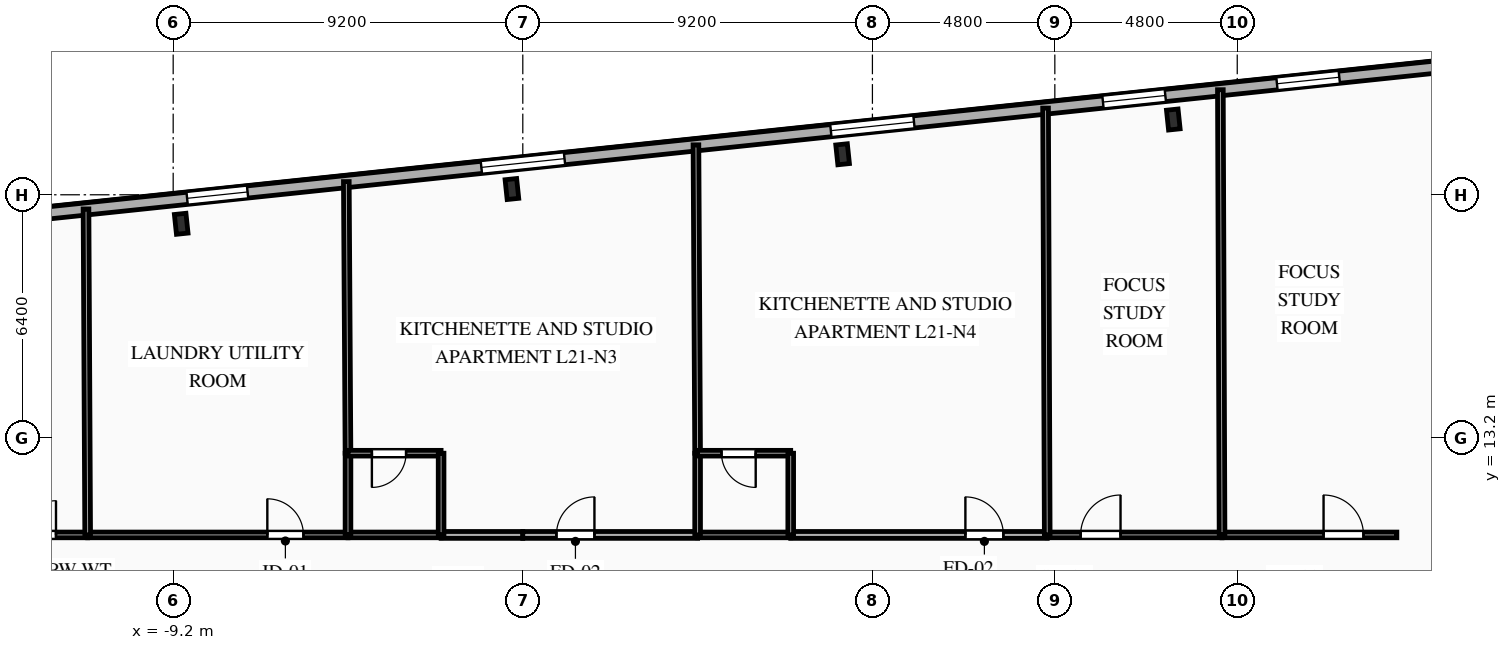
"""IFC4 building model, lengths in metres.
Left out: names, types, materials, properties, quantities, classifications, styles, units other than length and angle.
Written with IfcOpenShell. Run it as: python <this file> out.ifc"""

import sys

from ifc_helpers import new_model, si_unit, direction, frame, frame_2d, origin, origin_2d, place, context, subcontext, project, spatial, rectangle, i_section, extrude, element, fill, save


model = new_model("IFC4")
c1 = context("Model", 3, precision=1e-05, world=origin(), true_north=direction((0.0, 1.0)))
c2 = subcontext(c1, "Body", "Model", "MODEL_VIEW")
j1 = project(units=[si_unit("LENGTHUNIT", "METRE"), si_unit("PLANEANGLEUNIT", "RADIAN")], contexts=[c1])
p1 = place(None, origin())
s1 = spatial("IfcSite", under=j1, at=p1, CompositionType="ELEMENT")
p2 = place(p1, origin())
s2 = spatial("IfcBuilding", under=s1, at=p2, CompositionType="ELEMENT")
p3 = place(p2, frame((0.0, 0.0, 79.0)))
s3 = spatial("IfcBuildingStorey", under=s2, at=p3, CompositionType="ELEMENT", Elevation=79.0)
for number, where, z_axis, x_axis in (
    (1, (17.117, 21.58, 0.0), (0.0, 0.0, 1.0), (0.995, 0.105, 0.0)),
    (2, (8.415, 20.666, 0.0), (0.0, 0.0, 1.0), (0.995, 0.105, 0.0)),
    (3, (-0.287, 19.751, 0.0), (0.0, 0.0, 1.0), (0.995, 0.105, 0.0)),
    (4, (-8.989, 18.836, 0.0), (0.0, 0.0, 1.0), (0.995, 0.105, 0.0)),
):
    element("IfcColumn", number, at=place(p3, frame(where, z_axis=z_axis, x_axis=x_axis)), inside=s3, PredefinedType="COLUMN", context=c2, shape_type="SweptSolid", body=[
        extrude(i_section(OverallWidth=0.306, OverallDepth=0.524, WebThickness=0.021, FlangeThickness=0.04, FilletRadius=0.027, at=origin_2d()), origin(), (0.0, 0.0, 1.0), 3.35),
    ])
p4 = place(p3, frame((-27.107, 17.586, 0.0), z_axis=(0.0, 0.0, 1.0), x_axis=(0.994521628355, 0.104531003701, 0.0)))
e5 = element("IfcWall", 5, at=p4, inside=s3, PredefinedType="SOLIDWALL", context=c2, shape_type="SweptSolid", body=[
    extrude(rectangle(XDim=53.8, YDim=0.32, at=frame_2d((26.9, 0.0))), origin(), (0.0, 0.0, 1.0), 3.045),
])
p5 = place(p4, frame((1.482, 0.0, 0.85)))
e6 = element("IfcOpeningElement", 6, at=p5, cuts=e5, PredefinedType="OPENING", context=c2, shape_type="SweptSolid", body=[
    extrude(rectangle(XDim=1.6, YDim=1.85, at=frame_2d((0.8, 0.925))), frame((0.0, 0.17, 0.0), z_axis=(0.0, -1.0, 0.0), x_axis=(1.0, 0.0, 0.0)), (0.0, 0.0, 1.0), 0.34),
])
p6 = place(p4, frame((7.902, 0.0, 0.85)))
e7 = element("IfcOpeningElement", 7, at=p6, cuts=e5, PredefinedType="OPENING", context=c2, shape_type="SweptSolid", body=[
    extrude(rectangle(XDim=1.65, YDim=1.85, at=frame_2d((0.825, 0.925))), frame((0.0, 0.17, 0.0), z_axis=(0.0, -1.0, 0.0), x_axis=(1.0, 0.0, 0.0)), (0.0, 0.0, 1.0), 0.34),
])
p7 = place(p4, frame((18.374, 0.0, 0.85)))
e8 = element("IfcOpeningElement", 8, at=p7, cuts=e5, PredefinedType="OPENING", context=c2, shape_type="SweptSolid", body=[
    extrude(rectangle(XDim=1.6, YDim=1.85, at=frame_2d((0.8, 0.925))), frame((0.0, 0.17, 0.0), z_axis=(0.0, -1.0, 0.0), x_axis=(1.0, 0.0, 0.0)), (0.0, 0.0, 1.0), 0.34),
])
p8 = place(p4, frame((26.16, 0.0, 0.85)))
e9 = element("IfcOpeningElement", 9, at=p8, cuts=e5, PredefinedType="OPENING", context=c2, shape_type="SweptSolid", body=[
    extrude(rectangle(XDim=2.2, YDim=1.85, at=frame_2d((1.1, 0.925))), frame((0.0, 0.17, 0.0), z_axis=(0.0, -1.0, 0.0), x_axis=(1.0, 0.0, 0.0)), (0.0, 0.0, 1.0), 0.34),
])
p9 = place(p4, frame((35.407, 0.0, 0.85)))
e10 = element("IfcOpeningElement", 10, at=p9, cuts=e5, PredefinedType="OPENING", context=c2, shape_type="SweptSolid", body=[
    extrude(rectangle(XDim=2.2, YDim=1.85, at=frame_2d((1.1, 0.925))), frame((0.0, 0.17, 0.0), z_axis=(0.0, -1.0, 0.0), x_axis=(1.0, 0.0, 0.0)), (0.0, 0.0, 1.0), 0.34),
])
p10 = place(p4, frame((42.607, 0.0, 0.85)))
e11 = element("IfcOpeningElement", 11, at=p10, cuts=e5, PredefinedType="OPENING", context=c2, shape_type="SweptSolid", body=[
    extrude(rectangle(XDim=1.65, YDim=1.85, at=frame_2d((0.825, 0.925))), frame((0.0, 0.17, 0.0), z_axis=(0.0, -1.0, 0.0), x_axis=(1.0, 0.0, 0.0)), (0.0, 0.0, 1.0), 0.34),
])
p11 = place(p4, frame((47.211, 0.0, 0.85)))
e12 = element("IfcOpeningElement", 12, at=p11, cuts=e5, PredefinedType="OPENING", context=c2, shape_type="SweptSolid", body=[
    extrude(rectangle(XDim=1.65, YDim=1.85, at=frame_2d((0.825, 0.925))), frame((0.0, 0.17, 0.0), z_axis=(0.0, -1.0, 0.0), x_axis=(1.0, 0.0, 0.0)), (0.0, 0.0, 1.0), 0.34),
])
p12 = place(p3, frame((-13.8, 10.65, 0.0), z_axis=(0.0, 0.0, 1.0), x_axis=(1.0, 0.0, 0.0)))
e13 = element("IfcWall", 13, at=p12, inside=s3, PredefinedType="PLUMBINGWALL", context=c2, shape_type="SweptSolid", body=[
    extrude(rectangle(XDim=2.35, YDim=0.15, at=frame_2d((1.175, 0.0))), origin(), (0.0, 0.0, 1.0), 3.045),
])
p13 = place(p12, frame((0.616, 0.0, 0.0)))
e14 = element("IfcOpeningElement", 14, at=p13, cuts=e13, PredefinedType="OPENING", context=c2, shape_type="SweptSolid", body=[
    extrude(rectangle(XDim=0.9, YDim=2.1, at=frame_2d((0.45, 1.05))), frame((0.0, 0.085, 0.0), z_axis=(0.0, -1.0, 0.0), x_axis=(1.0, 0.0, 0.0)), (0.0, 0.0, 1.0), 0.17),
])
p14 = place(p3, frame((-11.45, 10.65, 0.0), z_axis=(0.0, 0.0, 1.0), x_axis=(1.0, 0.0, 0.0)))
e15 = element("IfcWall", 15, at=p14, inside=s3, PredefinedType="PARTITIONING", context=c2, shape_type="SweptSolid", body=[
    extrude(rectangle(XDim=6.85, YDim=0.15, at=frame_2d((3.425, 0.0))), origin(), (0.0, 0.0, 1.0), 3.045),
])
p15 = place(p14, frame((4.728, 0.0, 0.0)))
e16 = element("IfcOpeningElement", 16, at=p15, cuts=e15, PredefinedType="OPENING", context=c2, shape_type="SweptSolid", body=[
    extrude(rectangle(XDim=0.95, YDim=2.1, at=frame_2d((0.475, 1.05))), frame((0.0, 0.085, 0.0), z_axis=(0.0, -1.0, 0.0), x_axis=(1.0, 0.0, 0.0)), (0.0, 0.0, 1.0), 0.17),
])
p16 = place(p3, frame((-2.15, 10.65, 0.0), z_axis=(0.0, 0.0, 1.0), x_axis=(1.0, 0.0, 0.0)))
e17 = element("IfcWall", 17, at=p16, inside=s3, PredefinedType="PARTITIONING", context=c2, shape_type="SweptSolid", body=[
    extrude(rectangle(XDim=2.15, YDim=0.18, at=frame_2d((1.075, 0.0))), origin(), (0.0, 0.0, 1.0), 3.045),
])
p17 = place(p3, frame((-4.6, 10.65, 0.0), z_axis=(0.0, 0.0, 1.0), x_axis=(1.0, 0.0, 0.0)))
e18 = element("IfcWall", 18, at=p17, inside=s3, PredefinedType="PLUMBINGWALL", context=c2, shape_type="SweptSolid", body=[
    extrude(rectangle(XDim=2.45, YDim=0.15, at=frame_2d((1.225, 0.0))), origin(), (0.0, 0.0, 1.0), 3.045),
])
p18 = place(p3, frame((0.0, 10.65, 0.0), z_axis=(0.0, 0.0, 1.0), x_axis=(1.0, 0.0, 0.0)))
e19 = element("IfcWall", 19, at=p18, inside=s3, PredefinedType="PARTITIONING", context=c2, shape_type="SweptSolid", body=[
    extrude(rectangle(XDim=4.6, YDim=0.18, at=frame_2d((2.3, 0.0))), origin(), (0.0, 0.0, 1.0), 3.045),
])
p19 = place(p18, frame((0.885, 0.0, 0.0)))
e20 = element("IfcOpeningElement", 20, at=p19, cuts=e19, PredefinedType="OPENING", context=c2, shape_type="SweptSolid", body=[
    extrude(rectangle(XDim=1.0, YDim=2.15, at=frame_2d((0.5, 1.075))), frame((0.0, 0.1, 0.0), z_axis=(0.0, -1.0, 0.0), x_axis=(1.0, 0.0, 0.0)), (0.0, 0.0, 1.0), 0.2),
])
p20 = place(p3, frame((7.05, 10.65, 0.0), z_axis=(0.0, 0.0, 1.0), x_axis=(1.0, 0.0, 0.0)))
e21 = element("IfcWall", 21, at=p20, inside=s3, PredefinedType="PARTITIONING", context=c2, shape_type="SweptSolid", body=[
    extrude(rectangle(XDim=6.75, YDim=0.18, at=frame_2d((3.375, 0.0))), origin(), (0.0, 0.0, 1.0), 3.045),
])
p21 = place(p20, frame((4.596, 0.0, 0.0)))
e22 = element("IfcOpeningElement", 22, at=p21, cuts=e21, PredefinedType="OPENING", context=c2, shape_type="SweptSolid", body=[
    extrude(rectangle(XDim=1.0, YDim=2.15, at=frame_2d((0.5, 1.075))), frame((0.0, 0.1, 0.0), z_axis=(0.0, -1.0, 0.0), x_axis=(1.0, 0.0, 0.0)), (0.0, 0.0, 1.0), 0.2),
])
p22 = place(p3, frame((4.6, 10.65, 0.0), z_axis=(0.0, 0.0, 1.0), x_axis=(1.0, 0.0, 0.0)))
e23 = element("IfcWall", 23, at=p22, inside=s3, PredefinedType="PLUMBINGWALL", context=c2, shape_type="SweptSolid", body=[
    extrude(rectangle(XDim=2.45, YDim=0.15, at=frame_2d((1.225, 0.0))), origin(), (0.0, 0.0, 1.0), 3.045),
])
p23 = place(p3, frame((13.8, 10.65, 0.0), z_axis=(0.0, 0.0, 1.0), x_axis=(1.0, 0.0, 0.0)))
e24 = element("IfcWall", 24, at=p23, inside=s3, PredefinedType="PARTITIONING", context=c2, shape_type="SweptSolid", body=[
    extrude(rectangle(XDim=4.6, YDim=0.15, at=frame_2d((2.3, 0.0))), origin(), (0.0, 0.0, 1.0), 3.045),
])
p24 = place(p23, frame((0.879, 0.0, 0.0)))
e25 = element("IfcOpeningElement", 25, at=p24, cuts=e24, PredefinedType="OPENING", context=c2, shape_type="SweptSolid", body=[
    extrude(rectangle(XDim=1.05, YDim=2.15, at=frame_2d((0.525, 1.075))), frame((0.0, 0.085, 0.0), z_axis=(0.0, -1.0, 0.0), x_axis=(1.0, 0.0, 0.0)), (0.0, 0.0, 1.0), 0.17),
])
p25 = place(p3, frame((18.4, 10.65, 0.0), z_axis=(0.0, 0.0, 1.0), x_axis=(1.0, 0.0, 0.0)))
e26 = element("IfcWall", 26, at=p25, inside=s3, PredefinedType="PARTITIONING", context=c2, shape_type="SweptSolid", body=[
    extrude(rectangle(XDim=4.6, YDim=0.15, at=frame_2d((2.3, 0.0))), origin(), (0.0, 0.0, 1.0), 3.045),
])
p26 = place(p25, frame((2.671, 0.0, 0.0)))
e27 = element("IfcOpeningElement", 27, at=p26, cuts=e26, PredefinedType="OPENING", context=c2, shape_type="SweptSolid", body=[
    extrude(rectangle(XDim=1.05, YDim=2.15, at=frame_2d((0.525, 1.075))), frame((0.0, 0.085, 0.0), z_axis=(0.0, -1.0, 0.0), x_axis=(1.0, 0.0, 0.0)), (0.0, 0.0, 1.0), 0.17),
])
p27 = place(p3, frame((-11.494, 19.227, 0.0), z_axis=(0.0, 0.0, 1.0), x_axis=(0.005123612688, -0.99998687421, 0.0)))
e28 = element("IfcWall", 28, at=p27, inside=s3, PredefinedType="PLUMBINGWALL", context=c2, shape_type="SweptSolid", body=[
    extrude(rectangle(XDim=8.577, YDim=0.15, at=frame_2d((4.289, 0.0))), origin(), (0.0, 0.0, 1.0), 3.045),
])
p28 = place(p3, frame((-4.644, 19.947, 0.0), z_axis=(0.0, 0.0, 1.0), x_axis=(0.006114735543, -0.99998130483, 0.0)))
e29 = element("IfcWall", 29, at=p28, inside=s3, PredefinedType="PARTITIONING", context=c2, shape_type="SweptSolid", body=[
    extrude(rectangle(XDim=7.147, YDim=0.15, at=frame_2d((3.573, 0.0))), origin(), (0.0, 0.0, 1.0), 3.045),
])
p29 = place(p3, frame((-4.6, 12.8, 0.0), z_axis=(0.0, 0.0, 1.0), x_axis=(0.0, -1.0, 0.0)))
e30 = element("IfcWall", 30, at=p29, inside=s3, PredefinedType="PLUMBINGWALL", context=c2, shape_type="SweptSolid", body=[
    extrude(rectangle(XDim=2.15, YDim=0.15, at=frame_2d((1.075, 0.0))), origin(), (0.0, 0.0, 1.0), 3.045),
])
p30 = place(p3, frame((-2.15, 12.8, 0.0), z_axis=(0.0, 0.0, 1.0), x_axis=(-1.0, 0.0, 0.0)))
e31 = element("IfcWall", 31, at=p30, inside=s3, PredefinedType="PLUMBINGWALL", context=c2, shape_type="SweptSolid", body=[
    extrude(rectangle(XDim=2.45, YDim=0.15, at=frame_2d((1.225, 0.0))), origin(), (0.0, 0.0, 1.0), 3.045),
])
p31 = place(p30, frame((0.921, 0.0, 0.0)))
e32 = element("IfcOpeningElement", 32, at=p31, cuts=e31, PredefinedType="OPENING", context=c2, shape_type="SweptSolid", body=[
    extrude(rectangle(XDim=0.9, YDim=2.1, at=frame_2d((0.45, 1.05))), frame((0.0, 0.085, 0.0), z_axis=(0.0, -1.0, 0.0), x_axis=(1.0, 0.0, 0.0)), (0.0, 0.0, 1.0), 0.17),
])
p32 = place(p3, frame((-2.15, 10.65, 0.0), z_axis=(0.0, 0.0, 1.0), x_axis=(0.0, 1.0, 0.0)))
e33 = element("IfcWall", 33, at=p32, inside=s3, PredefinedType="PLUMBINGWALL", context=c2, shape_type="SweptSolid", body=[
    extrude(rectangle(XDim=2.15, YDim=0.15, at=frame_2d((1.075, 0.0))), origin(), (0.0, 0.0, 1.0), 3.045),
])
p33 = place(p3, frame((4.556, 20.914, 0.0), z_axis=(0.0, 0.0, 1.0), x_axis=(0.005416060659, -0.999985333036, 0.0)))
e34 = element("IfcWall", 34, at=p33, inside=s3, PredefinedType="PARTITIONING", context=c2, shape_type="SweptSolid", body=[
    extrude(rectangle(XDim=8.114, YDim=0.15, at=frame_2d((4.057, 0.0))), origin(), (0.0, 0.0, 1.0), 3.045),
])
p34 = place(p3, frame((4.6, 12.8, 0.0), z_axis=(0.0, 0.0, 1.0), x_axis=(0.0, -1.0, 0.0)))
e35 = element("IfcWall", 35, at=p34, inside=s3, PredefinedType="PLUMBINGWALL", context=c2, shape_type="SweptSolid", body=[
    extrude(rectangle(XDim=2.15, YDim=0.15, at=frame_2d((1.075, 0.0))), origin(), (0.0, 0.0, 1.0), 3.045),
])
p35 = place(p3, frame((7.05, 12.8, 0.0), z_axis=(0.0, 0.0, 1.0), x_axis=(-1.0, 0.0, 0.0)))
e36 = element("IfcWall", 36, at=p35, inside=s3, PredefinedType="PLUMBINGWALL", context=c2, shape_type="SweptSolid", body=[
    extrude(rectangle(XDim=2.45, YDim=0.15, at=frame_2d((1.225, 0.0))), origin(), (0.0, 0.0, 1.0), 3.045),
])
p36 = place(p35, frame((0.921, 0.0, 0.0)))
e37 = element("IfcOpeningElement", 37, at=p36, cuts=e36, PredefinedType="OPENING", context=c2, shape_type="SweptSolid", body=[
    extrude(rectangle(XDim=0.9, YDim=2.1, at=frame_2d((0.45, 1.05))), frame((0.0, 0.085, 0.0), z_axis=(0.0, -1.0, 0.0), x_axis=(1.0, 0.0, 0.0)), (0.0, 0.0, 1.0), 0.17),
])
p37 = place(p3, frame((7.05, 10.65, 0.0), z_axis=(0.0, 0.0, 1.0), x_axis=(0.0, 1.0, 0.0)))
e38 = element("IfcWall", 38, at=p37, inside=s3, PredefinedType="PLUMBINGWALL", context=c2, shape_type="SweptSolid", body=[
    extrude(rectangle(XDim=2.15, YDim=0.15, at=frame_2d((1.075, 0.0))), origin(), (0.0, 0.0, 1.0), 3.045),
])
p38 = place(p3, frame((13.756, 21.881, 0.0), z_axis=(0.0, 0.0, 1.0), x_axis=(0.003912928458, -0.999992344466, 0.0)))
e39 = element("IfcWall", 39, at=p38, inside=s3, PredefinedType="PARTITIONING", context=c2, shape_type="SweptSolid", body=[
    extrude(rectangle(XDim=11.231, YDim=0.15, at=frame_2d((5.615, 0.0))), origin(), (0.0, 0.0, 1.0), 3.045),
])
p39 = place(p3, frame((18.356, 22.364, 0.0), z_axis=(0.0, 0.0, 1.0), x_axis=(0.003730617419, -0.999993041223, 0.0)))
e40 = element("IfcWall", 40, at=p39, inside=s3, PredefinedType="PARTITIONING", context=c2, shape_type="SweptSolid", body=[
    extrude(rectangle(XDim=11.714, YDim=0.15, at=frame_2d((5.857, 0.0))), origin(), (0.0, 0.0, 1.0), 2.53),
])
p40 = place(p7, origin())
e41 = element("IfcWindow", 41, at=p40, inside=s3, PartitioningType="SINGLE_PANEL", PredefinedType="WINDOW", context=c2, shape_type="SweptSolid", body=[
    extrude(rectangle(XDim=1.6, YDim=1.85, at=frame_2d((0.8, 0.925))), frame((0.0, 0.03, 0.0), z_axis=(0.0, -1.0, 0.0), x_axis=(1.0, 0.0, 0.0)), (0.0, 0.0, 1.0), 0.06),
])
fill(e8, e41)
p41 = place(p8, origin())
e42 = element("IfcWindow", 42, at=p41, inside=s3, PartitioningType="SINGLE_PANEL", PredefinedType="WINDOW", context=c2, shape_type="SweptSolid", body=[
    extrude(rectangle(XDim=2.2, YDim=1.85, at=frame_2d((1.1, 0.925))), frame((0.0, 0.03, 0.0), z_axis=(0.0, -1.0, 0.0), x_axis=(1.0, 0.0, 0.0)), (0.0, 0.0, 1.0), 0.06),
])
fill(e9, e42)
p42 = place(p9, origin())
e43 = element("IfcWindow", 43, at=p42, inside=s3, PartitioningType="SINGLE_PANEL", PredefinedType="WINDOW", context=c2, shape_type="SweptSolid", body=[
    extrude(rectangle(XDim=2.2, YDim=1.85, at=frame_2d((1.1, 0.925))), frame((0.0, 0.03, 0.0), z_axis=(0.0, -1.0, 0.0), x_axis=(1.0, 0.0, 0.0)), (0.0, 0.0, 1.0), 0.06),
])
fill(e10, e43)
p43 = place(p10, origin())
e44 = element("IfcWindow", 44, at=p43, inside=s3, PartitioningType="SINGLE_PANEL", PredefinedType="WINDOW", context=c2, shape_type="SweptSolid", body=[
    extrude(rectangle(XDim=1.65, YDim=1.85, at=frame_2d((0.825, 0.925))), frame((0.0, 0.03, 0.0), z_axis=(0.0, -1.0, 0.0), x_axis=(1.0, 0.0, 0.0)), (0.0, 0.0, 1.0), 0.06),
])
fill(e11, e44)
p44 = place(p11, origin())
e45 = element("IfcWindow", 45, at=p44, inside=s3, PartitioningType="SINGLE_PANEL", PredefinedType="WINDOW", context=c2, shape_type="SweptSolid", body=[
    extrude(rectangle(XDim=1.65, YDim=1.85, at=frame_2d((0.825, 0.925))), frame((0.0, 0.03, 0.0), z_axis=(0.0, -1.0, 0.0), x_axis=(1.0, 0.0, 0.0)), (0.0, 0.0, 1.0), 0.06),
])
fill(e12, e45)
p45 = place(p13, origin())
e46 = element("IfcDoor", 46, at=p45, inside=s3, OperationType="SINGLE_SWING_RIGHT", PredefinedType="DOOR", context=c2, shape_type="SweptSolid", body=[
    extrude(rectangle(XDim=0.9, YDim=2.1, at=frame_2d((0.45, 1.05))), frame((0.0, 0.025, 0.0), z_axis=(0.0, -1.0, 0.0), x_axis=(1.0, 0.0, 0.0)), (0.0, 0.0, 1.0), 0.05),
])
fill(e14, e46)
p46 = place(p15, origin())
e47 = element("IfcDoor", 47, at=p46, inside=s3, OperationType="SINGLE_SWING_LEFT", PredefinedType="DOOR", context=c2, shape_type="SweptSolid", body=[
    extrude(rectangle(XDim=0.95, YDim=2.1, at=frame_2d((0.475, 1.05))), frame((0.0, 0.025, 0.0), z_axis=(0.0, -1.0, 0.0), x_axis=(1.0, 0.0, 0.0)), (0.0, 0.0, 1.0), 0.05),
])
fill(e16, e47)
p47 = place(p19, origin())
e48 = element("IfcDoor", 48, at=p47, inside=s3, OperationType="SINGLE_SWING_RIGHT", PredefinedType="DOOR", context=c2, shape_type="SweptSolid", body=[
    extrude(rectangle(XDim=1.0, YDim=2.15, at=frame_2d((0.5, 1.075))), frame((0.0, 0.025, 0.0), z_axis=(0.0, -1.0, 0.0), x_axis=(1.0, 0.0, 0.0)), (0.0, 0.0, 1.0), 0.05),
])
fill(e20, e48)
p48 = place(p21, origin())
e49 = element("IfcDoor", 49, at=p48, inside=s3, OperationType="SINGLE_SWING_LEFT", PredefinedType="DOOR", context=c2, shape_type="SweptSolid", body=[
    extrude(rectangle(XDim=1.0, YDim=2.15, at=frame_2d((0.5, 1.075))), frame((0.0, 0.025, 0.0), z_axis=(0.0, -1.0, 0.0), x_axis=(1.0, 0.0, 0.0)), (0.0, 0.0, 1.0), 0.05),
])
fill(e22, e49)
p49 = place(p24, origin())
e50 = element("IfcDoor", 50, at=p49, inside=s3, OperationType="SINGLE_SWING_RIGHT", PredefinedType="DOOR", context=c2, shape_type="SweptSolid", body=[
    extrude(rectangle(XDim=1.05, YDim=2.15, at=frame_2d((0.525, 1.075))), frame((0.0, 0.025, 0.0), z_axis=(0.0, -1.0, 0.0), x_axis=(1.0, 0.0, 0.0)), (0.0, 0.0, 1.0), 0.05),
])
fill(e25, e50)
p50 = place(p26, origin())
e51 = element("IfcDoor", 51, at=p50, inside=s3, OperationType="SINGLE_SWING_LEFT", PredefinedType="DOOR", context=c2, shape_type="SweptSolid", body=[
    extrude(rectangle(XDim=1.05, YDim=2.15, at=frame_2d((0.525, 1.075))), frame((0.0, 0.025, 0.0), z_axis=(0.0, -1.0, 0.0), x_axis=(1.0, 0.0, 0.0)), (0.0, 0.0, 1.0), 0.05),
])
fill(e27, e51)
p51 = place(p31, origin())
e52 = element("IfcDoor", 52, at=p51, inside=s3, OperationType="SINGLE_SWING_RIGHT", PredefinedType="DOOR", context=c2, shape_type="SweptSolid", body=[
    extrude(rectangle(XDim=0.9, YDim=2.1, at=frame_2d((0.45, 1.05))), frame((0.0, 0.025, 0.0), z_axis=(0.0, -1.0, 0.0), x_axis=(1.0, 0.0, 0.0)), (0.0, 0.0, 1.0), 0.05),
])
fill(e32, e52)
p52 = place(p36, origin())
e53 = element("IfcDoor", 53, at=p52, inside=s3, OperationType="SINGLE_SWING_LEFT", PredefinedType="DOOR", context=c2, shape_type="SweptSolid", body=[
    extrude(rectangle(XDim=0.9, YDim=2.1, at=frame_2d((0.45, 1.05))), frame((0.0, 0.025, 0.0), z_axis=(0.0, -1.0, 0.0), x_axis=(1.0, 0.0, 0.0)), (0.0, 0.0, 1.0), 0.05),
])
fill(e37, e53)
save(model, sys.argv[1])
